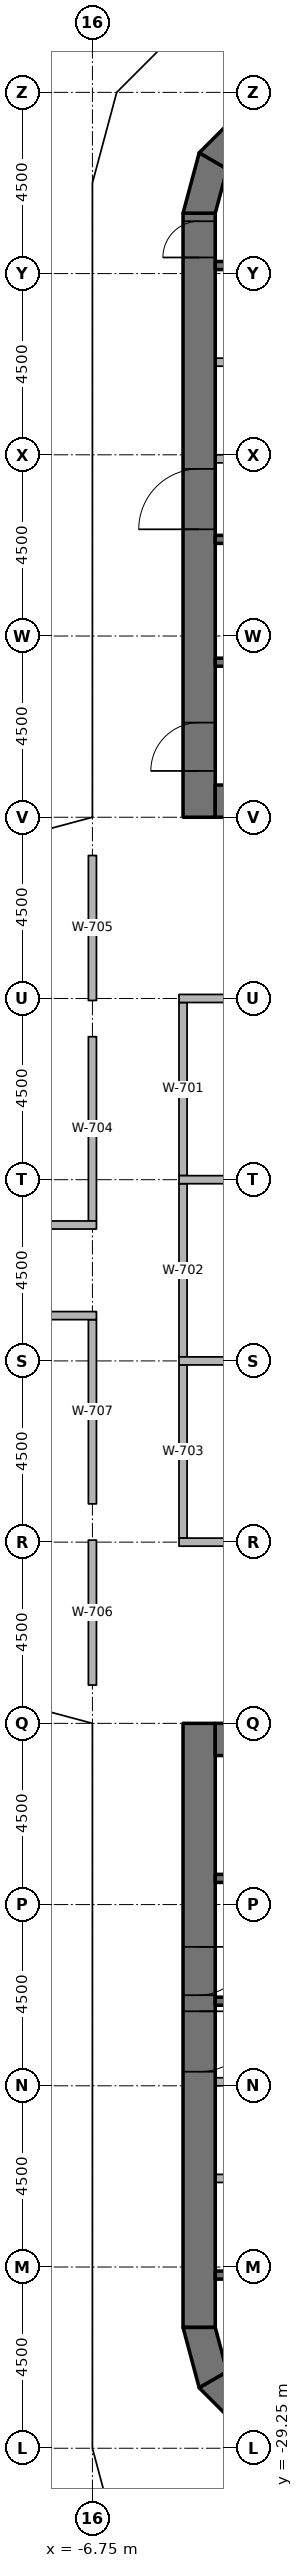
"""IFC4 building model, lengths in metres.
Left out: names, types, materials, properties, quantities, classifications, styles, units other than length and angle.
Written with IfcOpenShell. Run it as: python <this file> out.ifc"""

import sys

from ifc_helpers import new_model, si_unit, direction, frame, frame_2d, origin, origin_2d, place, context, subcontext, project, spatial, polyline, rectangle, outline, extrude, element, fill, save


model = new_model("IFC4")
c1 = context("Model", 3, precision=1e-05, world=origin(), true_north=direction((0.0, 1.0)))
c2 = subcontext(c1, "Body", "Model", "MODEL_VIEW")
j1 = project(units=[si_unit("LENGTHUNIT", "METRE"), si_unit("PLANEANGLEUNIT", "RADIAN")], contexts=[c1])
p1 = place(None, origin())
s1 = spatial("IfcSite", under=j1, at=p1, CompositionType="ELEMENT")
p2 = place(p1, origin())
s2 = spatial("IfcBuilding", under=s1, at=p2, CompositionType="ELEMENT")
p3 = place(p2, frame((0.0, 0.0, 94.2)))
s3 = spatial("IfcBuildingStorey", under=s2, at=p3, CompositionType="ELEMENT", Elevation=94.2)
for number, where, z_axis, x_axis in (
    (1, (-6.25, -26.9, 0.0), (0.0, 0.0, 1.0), (1.0, 0.0, 0.0)),
    (2, (-6.25, -24.65, 0.0), (0.0, 0.0, 1.0), (1.0, 0.0, 0.0)),
    (3, (-6.25, -20.25, 0.0), (0.0, 0.0, 1.0), (1.0, 0.0, 0.0)),
    (4, (-6.25, -15.75, 0.0), (0.0, 0.0, 1.0), (1.0, 0.0, 0.0)),
    (5, (-6.25, -10.75, 0.0), (0.0, 0.0, 1.0), (1.0, 0.0, 0.0)),
    (6, (-6.25, -6.25, 0.0), (0.0, 0.0, 1.0), (1.0, 0.0, 0.0)),
    (7, (-6.25, 6.25, 0.0), (0.0, 0.0, 1.0), (1.0, 0.0, 0.0)),
    (8, (-6.25, 10.75, 0.0), (0.0, 0.0, 1.0), (1.0, 0.0, 0.0)),
    (9, (-6.25, 15.75, 0.0), (0.0, 0.0, 1.0), (1.0, 0.0, 0.0)),
    (10, (-6.25, 20.25, 0.0), (0.0, 0.0, 1.0), (1.0, 0.0, 0.0)),
    (11, (-6.25, 24.65, 0.0), (0.0, 0.0, 1.0), (1.0, 0.0, 0.0)),
    (12, (-6.25, 26.7, 0.0), (0.0, 0.0, 1.0), (1.0, 0.0, 0.0)),
):
    element("IfcColumn", number, at=place(p3, frame(where, z_axis=z_axis, x_axis=x_axis)), inside=s3, PredefinedType="COLUMN", context=c2, shape_type="SweptSolid", body=[
        extrude(rectangle(XDim=0.9, YDim=0.9, at=origin_2d()), origin(), (0.0, 0.0, 1.0), 3.65),
    ])
p4 = place(p3, frame((-4.1, 11.25, 0.0), z_axis=(0.0, 0.0, 1.0), x_axis=(0.0, 1.0, 0.0)))
e13 = element("IfcWall", 13, at=p4, inside=s3, PredefinedType="SHEAR", context=c2, shape_type="SweptSolid", body=[
    extrude(rectangle(XDim=15.0, YDim=0.8, at=frame_2d((7.5, 0.0))), origin(), (0.0, 0.0, 1.0), 3.8),
])
p5 = place(p4, frame((7.15, 0.0, 0.0)))
e14 = element("IfcOpeningElement", 14, at=p5, cuts=e13, PredefinedType="OPENING", context=c2, shape_type="SweptSolid", body=[
    extrude(rectangle(XDim=1.5, YDim=2.3, at=frame_2d((0.75, 1.15))), frame((0.0, 0.41, 0.0), z_axis=(0.0, -1.0, 0.0), x_axis=(1.0, 0.0, 0.0)), (0.0, 0.0, 1.0), 0.82),
])
p6 = place(p4, frame((13.9, 0.0, 0.0)))
e15 = element("IfcOpeningElement", 15, at=p6, cuts=e13, PredefinedType="OPENING", context=c2, shape_type="SweptSolid", body=[
    extrude(rectangle(XDim=0.9, YDim=2.1, at=frame_2d((0.45, 1.05))), frame((0.0, 0.41, 0.0), z_axis=(0.0, -1.0, 0.0), x_axis=(1.0, 0.0, 0.0)), (0.0, 0.0, 1.0), 0.82),
])
p7 = place(p4, frame((1.15, 0.0, 0.0)))
e16 = element("IfcOpeningElement", 16, at=p7, cuts=e13, PredefinedType="OPENING", context=c2, shape_type="SweptSolid", body=[
    extrude(rectangle(XDim=1.2, YDim=2.1, at=frame_2d((0.6, 1.05))), frame((0.0, 0.41, 0.0), z_axis=(0.0, -1.0, 0.0), x_axis=(1.0, 0.0, 0.0)), (0.0, 0.0, 1.0), 0.82),
])
p8 = place(p3, frame((-3.7, 11.65, 0.0), z_axis=(0.0, 0.0, 1.0), x_axis=(1.0, 0.0, 0.0)))
e17 = element("IfcWall", 17, at=p8, inside=s3, PredefinedType="SHEAR", context=c2, shape_type="SweptSolid", body=[
    extrude(rectangle(XDim=7.4, YDim=0.8, at=frame_2d((3.7, 0.0))), origin(), (0.0, 0.0, 1.0), 3.8),
])
p9 = place(p3, origin())
e18 = element("IfcWall", 18, at=p9, inside=s3, PredefinedType="SHEAR", context=c2, shape_type="SweptSolid", body=[
    extrude(outline(polyline([(-4.5, 26.25), (-4.098, 27.75), (-3.405, 27.35), (-3.7, 26.25), (-4.5, 26.25)])), origin(), (0.0, 0.0, 1.0), 3.8),
])
p10 = place(p3, origin())
e19 = element("IfcWall", 19, at=p10, inside=s3, PredefinedType="SHEAR", context=c2, shape_type="SweptSolid", body=[
    extrude(outline(polyline([(-4.098, 27.75), (-3.0, 28.848), (-2.6, 28.155), (-3.405, 27.35), (-4.098, 27.75)])), origin(), (0.0, 0.0, 1.0), 3.8),
])
p11 = place(p3, frame((-4.1, -11.25, 0.0), z_axis=(0.0, 0.0, 1.0), x_axis=(0.0, -1.0, 0.0)))
e20 = element("IfcWall", 20, at=p11, inside=s3, PredefinedType="SHEAR", context=c2, shape_type="SweptSolid", body=[
    extrude(rectangle(XDim=15.0, YDim=0.8, at=frame_2d((7.5, 0.0))), origin(), (0.0, 0.0, 1.0), 3.8),
])
p12 = place(p11, frame((7.15, 0.0, 0.0)))
e21 = element("IfcOpeningElement", 21, at=p12, cuts=e20, PredefinedType="OPENING", context=c2, shape_type="SweptSolid", body=[
    extrude(rectangle(XDim=1.5, YDim=2.3, at=frame_2d((0.75, 1.15))), frame((0.0, 0.41, 0.0), z_axis=(0.0, -1.0, 0.0), x_axis=(1.0, 0.0, 0.0)), (0.0, 0.0, 1.0), 0.82),
])
p13 = place(p11, frame((5.55, 0.0, 0.0)))
e22 = element("IfcOpeningElement", 22, at=p13, cuts=e20, PredefinedType="OPENING", context=c2, shape_type="SweptSolid", body=[
    extrude(rectangle(XDim=1.2, YDim=2.1, at=frame_2d((0.6, 1.05))), frame((0.0, 0.41, 0.0), z_axis=(0.0, -1.0, 0.0), x_axis=(1.0, 0.0, 0.0)), (0.0, 0.0, 1.0), 0.82),
])
p14 = place(p3, frame((-3.7, -11.65, 0.0), z_axis=(0.0, 0.0, 1.0), x_axis=(1.0, 0.0, 0.0)))
e23 = element("IfcWall", 23, at=p14, inside=s3, PredefinedType="SHEAR", context=c2, shape_type="SweptSolid", body=[
    extrude(rectangle(XDim=7.4, YDim=0.8, at=frame_2d((3.7, 0.0))), origin(), (0.0, 0.0, 1.0), 3.8),
])
p15 = place(p3, origin())
e24 = element("IfcWall", 24, at=p15, inside=s3, PredefinedType="SHEAR", context=c2, shape_type="SweptSolid", body=[
    extrude(outline(polyline([(-4.5, -26.25), (-4.098, -27.75), (-3.405, -27.35), (-3.7, -26.25), (-4.5, -26.25)])), origin(), (0.0, 0.0, 1.0), 3.8),
])
p16 = place(p3, origin())
e25 = element("IfcWall", 25, at=p16, inside=s3, PredefinedType="SHEAR", context=c2, shape_type="SweptSolid", body=[
    extrude(outline(polyline([(-4.098, -27.75), (-3.0, -28.848), (-2.6, -28.155), (-3.405, -27.35), (-4.098, -27.75)])), origin(), (0.0, 0.0, 1.0), 3.8),
])
for number, where, z_axis, x_axis in (
    (26, (-3.7, 24.95, 0.0), (0.0, 0.0, 1.0), (1.0, 0.0, 0.0)),
    (27, (-3.7, 18.15, 0.0), (0.0, 0.0, 1.0), (1.0, 0.0, 0.0)),
    (28, (-3.7, 15.1, 0.0), (0.0, 0.0, 1.0), (1.0, 0.0, 0.0)),
):
    element("IfcWall", number, at=place(p3, frame(where, z_axis=z_axis, x_axis=x_axis)), inside=s3, PredefinedType="SHEAR", context=c2, shape_type="SweptSolid", body=[
        extrude(rectangle(XDim=7.4, YDim=0.2, at=frame_2d((3.7, 0.0))), origin(), (0.0, 0.0, 1.0), 3.65),
    ])
p17 = place(p3, frame((-3.7, 20.15, 0.0), z_axis=(0.0, 0.0, 1.0), x_axis=(1.0, 0.0, 0.0)))
e29 = element("IfcWall", 29, at=p17, inside=s3, PredefinedType="PARTITIONING", context=c2, shape_type="SweptSolid", body=[
    extrude(rectangle(XDim=2.8, YDim=0.2, at=frame_2d((1.4, 0.0))), origin(), (0.0, 0.0, 1.0), 3.65),
])
p18 = place(p3, frame((-3.7, 22.55, 0.0), z_axis=(0.0, 0.0, 1.0), x_axis=(1.0, 0.0, 0.0)))
e30 = element("IfcWall", 30, at=p18, inside=s3, PredefinedType="PARTITIONING", context=c2, shape_type="SweptSolid", body=[
    extrude(rectangle(XDim=2.6, YDim=0.2, at=frame_2d((1.3, 0.0))), origin(), (0.0, 0.0, 1.0), 3.65),
])
for number, where, z_axis, x_axis in (
    (31, (3.7, -24.95, 0.0), (0.0, 0.0, 1.0), (-1.0, 0.0, 0.0)),
    (32, (3.7, -18.15, 0.0), (0.0, 0.0, 1.0), (-1.0, 0.0, 0.0)),
    (33, (3.7, -15.1, 0.0), (0.0, 0.0, 1.0), (-1.0, 0.0, 0.0)),
):
    element("IfcWall", number, at=place(p3, frame(where, z_axis=z_axis, x_axis=x_axis)), inside=s3, PredefinedType="SHEAR", context=c2, shape_type="SweptSolid", body=[
        extrude(rectangle(XDim=7.4, YDim=0.2, at=frame_2d((3.7, 0.0))), origin(), (0.0, 0.0, 1.0), 3.65),
    ])
p19 = place(p3, frame((-0.9, -20.15, 0.0), z_axis=(0.0, 0.0, 1.0), x_axis=(-1.0, 0.0, 0.0)))
e34 = element("IfcWall", 34, at=p19, inside=s3, PredefinedType="PARTITIONING", context=c2, shape_type="SweptSolid", body=[
    extrude(rectangle(XDim=2.8, YDim=0.2, at=frame_2d((1.4, 0.0))), origin(), (0.0, 0.0, 1.0), 3.65),
])
p20 = place(p3, frame((-1.1, -22.55, 0.0), z_axis=(0.0, 0.0, 1.0), x_axis=(-1.0, 0.0, 0.0)))
e35 = element("IfcWall", 35, at=p20, inside=s3, PredefinedType="PARTITIONING", context=c2, shape_type="SweptSolid", body=[
    extrude(rectangle(XDim=2.6, YDim=0.2, at=frame_2d((1.3, 0.0))), origin(), (0.0, 0.0, 1.0), 3.65),
])
for number, where, z_axis, x_axis in (
    (36, (-4.5, 2.35, 0.0), (0.0, 0.0, 1.0), (0.0, 1.0, 0.0)),
    (37, (-4.5, -2.15, 0.0), (0.0, 0.0, 1.0), (0.0, 1.0, 0.0)),
    (38, (-4.5, -6.65, 0.0), (0.0, 0.0, 1.0), (0.0, 1.0, 0.0)),
):
    element("IfcWall", number, at=place(p3, frame(where, z_axis=z_axis, x_axis=x_axis)), inside=s3, PredefinedType="PARTITIONING", context=c2, shape_type="SweptSolid", body=[
        extrude(rectangle(XDim=4.3, YDim=0.2, at=frame_2d((2.15, 0.0))), origin(), (0.0, 0.0, 1.0), 2.738),
    ])
p21 = place(p3, frame((-6.75, 1.225, 0.0), z_axis=(0.0, 0.0, 1.0), x_axis=(0.0, 1.0, 0.0)))
e39 = element("IfcWall", 39, at=p21, inside=s3, PredefinedType="PARTITIONING", context=c2, shape_type="SweptSolid", body=[
    extrude(rectangle(XDim=4.575, YDim=0.2, at=frame_2d((2.288, 0.0))), origin(), (0.0, 0.0, 1.0), 2.738),
])
for number, where, z_axis, x_axis in (
    (40, (-6.75, 6.7, 0.0), (0.0, 0.0, 1.0), (0.0, 1.0, 0.0)),
    (41, (-6.75, -10.3, 0.0), (0.0, 0.0, 1.0), (0.0, 1.0, 0.0)),
):
    element("IfcWall", number, at=place(p3, frame(where, z_axis=z_axis, x_axis=x_axis)), inside=s3, PredefinedType="PARTITIONING", context=c2, shape_type="SweptSolid", body=[
        extrude(rectangle(XDim=3.6, YDim=0.2, at=frame_2d((1.8, 0.0))), origin(), (0.0, 0.0, 1.0), 2.738),
    ])
p22 = place(p3, frame((-6.75, -5.8, 0.0), z_axis=(0.0, 0.0, 1.0), x_axis=(0.0, 1.0, 0.0)))
e42 = element("IfcWall", 42, at=p22, inside=s3, PredefinedType="PARTITIONING", context=c2, shape_type="SweptSolid", body=[
    extrude(rectangle(XDim=4.575, YDim=0.2, at=frame_2d((2.288, 0.0))), origin(), (0.0, 0.0, 1.0), 2.738),
])
p23 = place(p3, frame((4.6, 6.75, 0.0), z_axis=(0.0, 0.0, 1.0), x_axis=(-1.0, 0.0, 0.0)))
e43 = element("IfcWall", 43, at=p23, inside=s3, PredefinedType="PARTITIONING", context=c2, shape_type="SweptSolid", body=[
    extrude(rectangle(XDim=9.2, YDim=0.2, at=frame_2d((4.6, 0.0))), origin(), (0.0, 0.0, 1.0), 2.738),
])
p24 = place(p23, frame((4.1, 0.0, 0.0)))
e44 = element("IfcOpeningElement", 44, at=p24, cuts=e43, PredefinedType="OPENING", context=c2, shape_type="SweptSolid", body=[
    extrude(rectangle(XDim=1.0, YDim=2.1, at=frame_2d((0.5, 1.05))), frame((0.0, 0.11, 0.0), z_axis=(0.0, -1.0, 0.0), x_axis=(1.0, 0.0, 0.0)), (0.0, 0.0, 1.0), 0.22),
])
p25 = place(p3, frame((-4.6, -6.75, 0.0), z_axis=(0.0, 0.0, 1.0), x_axis=(1.0, 0.0, 0.0)))
e45 = element("IfcWall", 45, at=p25, inside=s3, PredefinedType="PARTITIONING", context=c2, shape_type="SweptSolid", body=[
    extrude(rectangle(XDim=9.2, YDim=0.2, at=frame_2d((4.6, 0.0))), origin(), (0.0, 0.0, 1.0), 2.738),
])
p26 = place(p25, frame((4.1, 0.0, 0.0)))
e46 = element("IfcOpeningElement", 46, at=p26, cuts=e45, PredefinedType="OPENING", context=c2, shape_type="SweptSolid", body=[
    extrude(rectangle(XDim=1.0, YDim=2.1, at=frame_2d((0.5, 1.05))), frame((0.0, 0.11, 0.0), z_axis=(0.0, -1.0, 0.0), x_axis=(1.0, 0.0, 0.0)), (0.0, 0.0, 1.0), 0.22),
])
for number, where, z_axis, x_axis in (
    (47, (-4.6, 2.25, 0.0), (0.0, 0.0, 1.0), (1.0, 0.0, 0.0)),
    (48, (-4.6, -2.25, 0.0), (0.0, 0.0, 1.0), (1.0, 0.0, 0.0)),
):
    element("IfcWall", number, at=place(p3, frame(where, z_axis=z_axis, x_axis=x_axis)), inside=s3, PredefinedType="PARTITIONING", context=c2, shape_type="SweptSolid", body=[
        extrude(rectangle(XDim=9.2, YDim=0.2, at=frame_2d((4.6, 0.0))), origin(), (0.0, 0.0, 1.0), 2.738),
    ])
p27 = place(p3, frame((-11.35, 1.125, 0.0), z_axis=(0.0, 0.0, 1.0), x_axis=(1.0, 0.0, 0.0)))
e49 = element("IfcWall", 49, at=p27, inside=s3, PredefinedType="PARTITIONING", context=c2, shape_type="SweptSolid", body=[
    extrude(rectangle(XDim=4.7, YDim=0.2, at=frame_2d((2.35, 0.0))), origin(), (0.0, 0.0, 1.0), 2.738),
])
p28 = place(p27, frame((1.85, 0.0, 0.0)))
e50 = element("IfcOpeningElement", 50, at=p28, cuts=e49, PredefinedType="OPENING", context=c2, shape_type="SweptSolid", body=[
    extrude(rectangle(XDim=1.0, YDim=2.1, at=frame_2d((0.5, 1.05))), frame((0.0, 0.11, 0.0), z_axis=(0.0, -1.0, 0.0), x_axis=(1.0, 0.0, 0.0)), (0.0, 0.0, 1.0), 0.22),
])
p29 = place(p3, frame((-6.65, -1.125, 0.0), z_axis=(0.0, 0.0, 1.0), x_axis=(-1.0, 0.0, 0.0)))
e51 = element("IfcWall", 51, at=p29, inside=s3, PredefinedType="PARTITIONING", context=c2, shape_type="SweptSolid", body=[
    extrude(rectangle(XDim=4.7, YDim=0.2, at=frame_2d((2.35, 0.0))), origin(), (0.0, 0.0, 1.0), 2.738),
])
p30 = place(p29, frame((1.85, 0.0, 0.0)))
e52 = element("IfcOpeningElement", 52, at=p30, cuts=e51, PredefinedType="OPENING", context=c2, shape_type="SweptSolid", body=[
    extrude(rectangle(XDim=1.0, YDim=2.1, at=frame_2d((0.5, 1.05))), frame((0.0, 0.11, 0.0), z_axis=(0.0, -1.0, 0.0), x_axis=(1.0, 0.0, 0.0)), (0.0, 0.0, 1.0), 0.22),
])
p31 = place(p5, origin())
e53 = element("IfcDoor", 53, at=p31, inside=s3, OperationType="DOUBLE_DOOR_SINGLE_SWING", PredefinedType="DOOR", context=c2, shape_type="SweptSolid", body=[
    extrude(rectangle(XDim=1.5, YDim=2.3, at=frame_2d((0.75, 1.15))), frame((0.0, 0.025, 0.0), z_axis=(0.0, -1.0, 0.0), x_axis=(1.0, 0.0, 0.0)), (0.0, 0.0, 1.0), 0.05),
])
fill(e14, e53)
p32 = place(p6, origin())
e54 = element("IfcDoor", 54, at=p32, inside=s3, OperationType="SINGLE_SWING_RIGHT", PredefinedType="DOOR", context=c2, shape_type="SweptSolid", body=[
    extrude(rectangle(XDim=0.9, YDim=2.1, at=frame_2d((0.45, 1.05))), frame((0.0, 0.025, 0.0), z_axis=(0.0, -1.0, 0.0), x_axis=(1.0, 0.0, 0.0)), (0.0, 0.0, 1.0), 0.05),
])
fill(e15, e54)
p33 = place(p7, origin())
e55 = element("IfcDoor", 55, at=p33, inside=s3, OperationType="SINGLE_SWING_RIGHT", PredefinedType="DOOR", context=c2, shape_type="SweptSolid", body=[
    extrude(rectangle(XDim=1.2, YDim=2.1, at=frame_2d((0.6, 1.05))), frame((0.0, 0.025, 0.0), z_axis=(0.0, -1.0, 0.0), x_axis=(1.0, 0.0, 0.0)), (0.0, 0.0, 1.0), 0.05),
])
fill(e16, e55)
p34 = place(p12, origin())
e56 = element("IfcDoor", 56, at=p34, inside=s3, OperationType="DOUBLE_DOOR_SINGLE_SWING", PredefinedType="DOOR", context=c2, shape_type="SweptSolid", body=[
    extrude(rectangle(XDim=1.5, YDim=2.3, at=frame_2d((0.75, 1.15))), frame((0.0, 0.025, 0.0), z_axis=(0.0, -1.0, 0.0), x_axis=(1.0, 0.0, 0.0)), (0.0, 0.0, 1.0), 0.05),
])
fill(e21, e56)
p35 = place(p13, origin())
e57 = element("IfcDoor", 57, at=p35, inside=s3, OperationType="SINGLE_SWING_LEFT", PredefinedType="DOOR", context=c2, shape_type="SweptSolid", body=[
    extrude(rectangle(XDim=1.2, YDim=2.1, at=frame_2d((0.6, 1.05))), frame((0.0, 0.025, 0.0), z_axis=(0.0, -1.0, 0.0), x_axis=(1.0, 0.0, 0.0)), (0.0, 0.0, 1.0), 0.05),
])
fill(e22, e57)
save(model, sys.argv[1])
